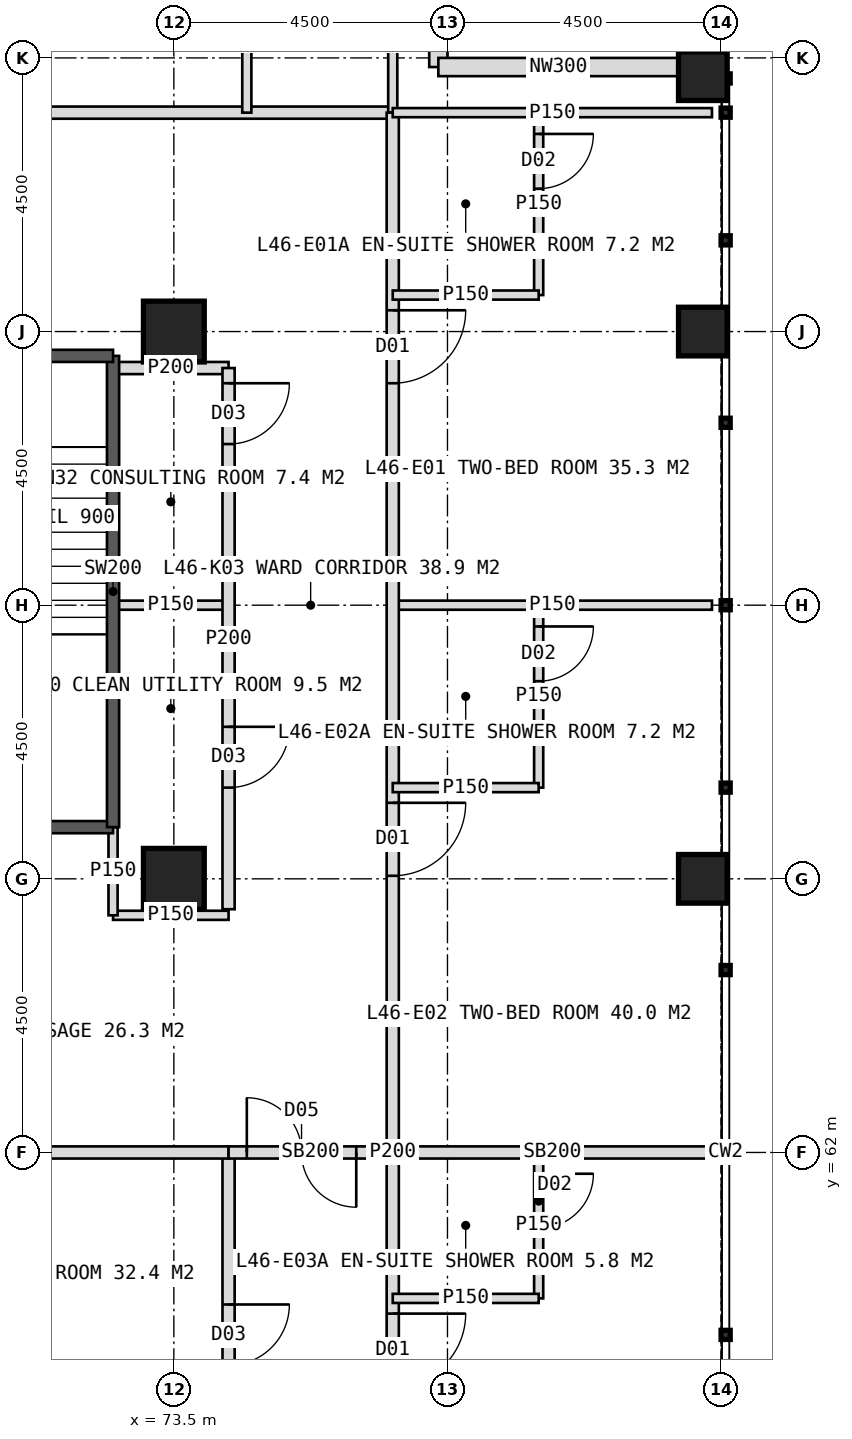
"""IFC4 building model, lengths in metres.
Left out: names, types, materials, properties, quantities, classifications, styles, units other than length and angle.
Written with IfcOpenShell. Run it as: python <this file> out.ifc"""

import sys

from ifc_helpers import new_model, si_unit, direction, frame, frame_2d, origin, origin_2d, place, context, subcontext, project, spatial, rectangle, hollow_rectangle, extrude, element, fill, save


model = new_model("IFC4")
c1 = context("Model", 3, precision=1e-05, world=origin(), true_north=direction((0.0, 1.0)))
c2 = subcontext(c1, "Body", "Model", "MODEL_VIEW")
j1 = project(units=[si_unit("LENGTHUNIT", "METRE"), si_unit("PLANEANGLEUNIT", "RADIAN")], contexts=[c1])
p1 = place(None, origin())
s1 = spatial("IfcSite", under=j1, at=p1, CompositionType="ELEMENT")
p2 = place(p1, origin())
s2 = spatial("IfcBuilding", under=s1, at=p2, CompositionType="ELEMENT")
p3 = place(p2, frame((0.0, 0.0, 193.0)))
s3 = spatial("IfcBuildingStorey", under=s2, at=p3, CompositionType="ELEMENT", Elevation=193.0)
for number, where, z_axis, x_axis in (
    (1, (73.5, 75.5, 0.0), (0.0, 0.0, 1.0), (1.0, 0.0, 0.0)),
    (2, (73.5, 66.5, 0.0), (0.0, 0.0, 1.0), (1.0, 0.0, 0.0)),
):
    element("IfcColumn", number, at=place(p3, frame(where, z_axis=z_axis, x_axis=x_axis)), inside=s3, PredefinedType="COLUMN", context=c2, shape_type="SweptSolid", body=[
        extrude(hollow_rectangle(XDim=1.0, YDim=1.0, WallThickness=0.1, at=origin_2d()), origin(), (0.0, 0.0, 1.0), 4.0),
    ])
for number, where, z_axis, x_axis in (
    (3, (82.2, 66.5, 0.0), (0.0, 0.0, 1.0), (1.0, 0.0, 0.0)),
    (4, (82.2, 75.5, 0.0), (0.0, 0.0, 1.0), (1.0, 0.0, 0.0)),
    (5, (82.2, 79.7, 0.0), (0.0, 0.0, 1.0), (1.0, 0.0, 0.0)),
):
    element("IfcColumn", number, at=place(p3, frame(where, z_axis=z_axis, x_axis=x_axis)), inside=s3, PredefinedType="COLUMN", context=c2, shape_type="SweptSolid", body=[
        extrude(hollow_rectangle(XDim=0.8, YDim=0.8, WallThickness=0.08, at=origin_2d()), origin(), (0.0, 0.0, 1.0), 4.0),
    ])
for number, where, z_axis, x_axis in (
    (6, (77.85, 83.8, 0.0), (0.0, 0.0, 1.0), (0.0, -1.0, 0.0)),
    (7, (77.85, 79.85, 0.0), (0.0, 0.0, 1.0), (1.0, 0.0, 0.0)),
):
    element("IfcWall", number, at=place(p3, frame(where, z_axis=z_axis, x_axis=x_axis)), inside=s3, PredefinedType="ELEMENTEDWALL", context=c2, shape_type="SweptSolid", body=[
        extrude(rectangle(XDim=3.95, YDim=0.3, at=frame_2d((1.975, 0.0))), origin(), (0.0, 0.0, 1.0), 2.85),
    ])
p4 = place(p3, frame((42.9, 79.1, 0.0), z_axis=(0.0, 0.0, 1.0), x_axis=(1.0, 0.0, 0.0)))
e8 = element("IfcWall", 8, at=p4, inside=s3, PredefinedType="PARTITIONING", context=c2, shape_type="SweptSolid", body=[
    extrude(rectangle(XDim=34.2, YDim=0.2, at=frame_2d((17.1, 0.0))), origin(), (0.0, 0.0, 1.0), 3.75),
])
p5 = place(p4, frame((3.25, 0.0, 0.0)))
e9 = element("IfcOpeningElement", 9, at=p5, cuts=e8, PredefinedType="OPENING", context=c2, shape_type="SweptSolid", body=[
    extrude(rectangle(XDim=1.2, YDim=2.2, at=frame_2d((0.6, 1.1))), frame((0.0, 0.11, 0.0), z_axis=(0.0, -1.0, 0.0), x_axis=(1.0, 0.0, 0.0)), (0.0, 0.0, 1.0), 0.22),
])
p6 = place(p4, frame((10.6, 0.0, 0.0)))
e10 = element("IfcOpeningElement", 10, at=p6, cuts=e8, PredefinedType="OPENING", context=c2, shape_type="SweptSolid", body=[
    extrude(rectangle(XDim=1.0, YDim=2.1, at=frame_2d((0.5, 1.05))), frame((0.0, 0.11, 0.0), z_axis=(0.0, -1.0, 0.0), x_axis=(1.0, 0.0, 0.0)), (0.0, 0.0, 1.0), 0.22),
])
p7 = place(p4, frame((17.35, 0.0, 0.0)))
e11 = element("IfcOpeningElement", 11, at=p7, cuts=e8, PredefinedType="OPENING", context=c2, shape_type="SweptSolid", body=[
    extrude(rectangle(XDim=1.2, YDim=2.2, at=frame_2d((0.6, 1.1))), frame((0.0, 0.11, 0.0), z_axis=(0.0, -1.0, 0.0), x_axis=(1.0, 0.0, 0.0)), (0.0, 0.0, 1.0), 0.22),
])
p8 = place(p4, frame((25.75, 0.0, 0.0)))
e12 = element("IfcOpeningElement", 12, at=p8, cuts=e8, PredefinedType="OPENING", context=c2, shape_type="SweptSolid", body=[
    extrude(rectangle(XDim=1.2, YDim=2.2, at=frame_2d((0.6, 1.1))), frame((0.0, 0.11, 0.0), z_axis=(0.0, -1.0, 0.0), x_axis=(1.0, 0.0, 0.0)), (0.0, 0.0, 1.0), 0.22),
])
for number, where, z_axis, x_axis in (
    (13, (74.7, 79.1, 0.0), (0.0, 0.0, 1.0), (0.0, 1.0, 0.0)),
    (14, (77.1, 79.1, 0.0), (0.0, 0.0, 1.0), (0.0, 1.0, 0.0)),
):
    element("IfcWall", number, at=place(p3, frame(where, z_axis=z_axis, x_axis=x_axis)), inside=s3, PredefinedType="PARTITIONING", context=c2, shape_type="SweptSolid", body=[
        extrude(rectangle(XDim=2.4, YDim=0.15, at=frame_2d((1.2, 0.0))), origin(), (0.0, 0.0, 1.0), 3.75),
    ])
p9 = place(p3, frame((72.5, 74.9, 0.0), z_axis=(0.0, 0.0, 1.0), x_axis=(1.0, 0.0, 0.0)))
e15 = element("IfcWall", 15, at=p9, inside=s3, PredefinedType="PARTITIONING", context=c2, shape_type="SweptSolid", body=[
    extrude(rectangle(XDim=1.9, YDim=0.2, at=frame_2d((0.95, 0.0))), origin(), (0.0, 0.0, 1.0), 3.75),
])
p10 = place(p3, frame((77.1, 71.0, 0.0), z_axis=(0.0, 0.0, 1.0), x_axis=(1.0, 0.0, 0.0)))
e16 = element("IfcWall", 16, at=p10, inside=s3, PredefinedType="PARTITIONING", context=c2, shape_type="SweptSolid", body=[
    extrude(rectangle(XDim=5.25, YDim=0.15, at=frame_2d((2.625, 0.0))), origin(), (0.0, 0.0, 1.0), 3.75),
])
p11 = place(p3, frame((77.1, 62.0, 0.0), z_axis=(0.0, 0.0, 1.0), x_axis=(1.0, 0.0, 0.0)))
e17 = element("IfcWall", 17, at=p11, inside=s3, PredefinedType="SOLIDWALL", context=c2, shape_type="SweptSolid", body=[
    extrude(rectangle(XDim=5.25, YDim=0.2, at=frame_2d((2.625, 0.0))), origin(), (0.0, 0.0, 1.0), 2.95),
])
p12 = place(p3, frame((77.1, 79.1, 0.0), z_axis=(0.0, 0.0, 1.0), x_axis=(0.0, -1.0, 0.0)))
e18 = element("IfcWall", 18, at=p12, inside=s3, PredefinedType="PARTITIONING", context=c2, shape_type="SweptSolid", body=[
    extrude(rectangle(XDim=34.2, YDim=0.2, at=frame_2d((17.1, 0.0))), origin(), (0.0, 0.0, 1.0), 3.75),
])
p13 = place(p12, frame((3.25, 0.0, 0.0)))
e19 = element("IfcOpeningElement", 19, at=p13, cuts=e18, PredefinedType="OPENING", context=c2, shape_type="SweptSolid", body=[
    extrude(rectangle(XDim=1.2, YDim=2.2, at=frame_2d((0.6, 1.1))), frame((0.0, 0.11, 0.0), z_axis=(0.0, -1.0, 0.0), x_axis=(1.0, 0.0, 0.0)), (0.0, 0.0, 1.0), 0.22),
])
p14 = place(p12, frame((11.35, 0.0, 0.0)))
e20 = element("IfcOpeningElement", 20, at=p14, cuts=e18, PredefinedType="OPENING", context=c2, shape_type="SweptSolid", body=[
    extrude(rectangle(XDim=1.2, YDim=2.2, at=frame_2d((0.6, 1.1))), frame((0.0, 0.11, 0.0), z_axis=(0.0, -1.0, 0.0), x_axis=(1.0, 0.0, 0.0)), (0.0, 0.0, 1.0), 0.22),
])
p15 = place(p12, frame((19.75, 0.0, 0.0)))
e21 = element("IfcOpeningElement", 21, at=p15, cuts=e18, PredefinedType="OPENING", context=c2, shape_type="SweptSolid", body=[
    extrude(rectangle(XDim=1.2, YDim=2.2, at=frame_2d((0.6, 1.1))), frame((0.0, 0.11, 0.0), z_axis=(0.0, -1.0, 0.0), x_axis=(1.0, 0.0, 0.0)), (0.0, 0.0, 1.0), 0.22),
])
p16 = place(p12, frame((25.75, 0.0, 0.0)))
e22 = element("IfcOpeningElement", 22, at=p16, cuts=e18, PredefinedType="OPENING", context=c2, shape_type="SweptSolid", body=[
    extrude(rectangle(XDim=1.2, YDim=2.2, at=frame_2d((0.6, 1.1))), frame((0.0, 0.11, 0.0), z_axis=(0.0, -1.0, 0.0), x_axis=(1.0, 0.0, 0.0)), (0.0, 0.0, 1.0), 0.22),
])
p17 = place(p3, frame((77.1, 79.1, 0.0), z_axis=(0.0, 0.0, 1.0), x_axis=(1.0, 0.0, 0.0)))
e23 = element("IfcWall", 23, at=p17, inside=s3, PredefinedType="PARTITIONING", context=c2, shape_type="SweptSolid", body=[
    extrude(rectangle(XDim=5.25, YDim=0.15, at=frame_2d((2.625, 0.0))), origin(), (0.0, 0.0, 1.0), 3.75),
])
p18 = place(p3, frame((79.5, 79.1, 0.0), z_axis=(0.0, 0.0, 1.0), x_axis=(0.0, -1.0, 0.0)))
e24 = element("IfcWall", 24, at=p18, inside=s3, PredefinedType="PARTITIONING", context=c2, shape_type="SweptSolid", body=[
    extrude(rectangle(XDim=3.0, YDim=0.15, at=frame_2d((1.5, 0.0))), origin(), (0.0, 0.0, 1.0), 3.75),
])
p19 = place(p18, frame((0.35, 0.0, 0.0)))
e25 = element("IfcOpeningElement", 25, at=p19, cuts=e24, PredefinedType="OPENING", context=c2, shape_type="SweptSolid", body=[
    extrude(rectangle(XDim=0.9, YDim=2.1, at=frame_2d((0.45, 1.05))), frame((0.0, 0.085, 0.0), z_axis=(0.0, -1.0, 0.0), x_axis=(1.0, 0.0, 0.0)), (0.0, 0.0, 1.0), 0.17),
])
p20 = place(p3, frame((77.1, 76.1, 0.0), z_axis=(0.0, 0.0, 1.0), x_axis=(1.0, 0.0, 0.0)))
e26 = element("IfcWall", 26, at=p20, inside=s3, PredefinedType="PARTITIONING", context=c2, shape_type="SweptSolid", body=[
    extrude(rectangle(XDim=2.4, YDim=0.15, at=frame_2d((1.2, 0.0))), origin(), (0.0, 0.0, 1.0), 3.75),
])
p21 = place(p3, frame((79.5, 71.0, 0.0), z_axis=(0.0, 0.0, 1.0), x_axis=(0.0, -1.0, 0.0)))
e27 = element("IfcWall", 27, at=p21, inside=s3, PredefinedType="PARTITIONING", context=c2, shape_type="SweptSolid", body=[
    extrude(rectangle(XDim=3.0, YDim=0.15, at=frame_2d((1.5, 0.0))), origin(), (0.0, 0.0, 1.0), 3.75),
])
p22 = place(p21, frame((0.35, 0.0, 0.0)))
e28 = element("IfcOpeningElement", 28, at=p22, cuts=e27, PredefinedType="OPENING", context=c2, shape_type="SweptSolid", body=[
    extrude(rectangle(XDim=0.9, YDim=2.1, at=frame_2d((0.45, 1.05))), frame((0.0, 0.085, 0.0), z_axis=(0.0, -1.0, 0.0), x_axis=(1.0, 0.0, 0.0)), (0.0, 0.0, 1.0), 0.17),
])
p23 = place(p3, frame((77.1, 68.0, 0.0), z_axis=(0.0, 0.0, 1.0), x_axis=(1.0, 0.0, 0.0)))
e29 = element("IfcWall", 29, at=p23, inside=s3, PredefinedType="PARTITIONING", context=c2, shape_type="SweptSolid", body=[
    extrude(rectangle(XDim=2.4, YDim=0.15, at=frame_2d((1.2, 0.0))), origin(), (0.0, 0.0, 1.0), 3.75),
])
p24 = place(p3, frame((79.5, 62.0, 0.0), z_axis=(0.0, 0.0, 1.0), x_axis=(0.0, -1.0, 0.0)))
e30 = element("IfcWall", 30, at=p24, inside=s3, PredefinedType="PARTITIONING", context=c2, shape_type="SweptSolid", body=[
    extrude(rectangle(XDim=2.4, YDim=0.15, at=frame_2d((1.2, 0.0))), origin(), (0.0, 0.0, 1.0), 3.75),
])
p25 = place(p24, frame((0.35, 0.0, 0.0)))
e31 = element("IfcOpeningElement", 31, at=p25, cuts=e30, PredefinedType="OPENING", context=c2, shape_type="SweptSolid", body=[
    extrude(rectangle(XDim=0.9, YDim=2.1, at=frame_2d((0.45, 1.05))), frame((0.0, 0.085, 0.0), z_axis=(0.0, -1.0, 0.0), x_axis=(1.0, 0.0, 0.0)), (0.0, 0.0, 1.0), 0.17),
])
p26 = place(p3, frame((77.1, 59.6, 0.0), z_axis=(0.0, 0.0, 1.0), x_axis=(1.0, 0.0, 0.0)))
e32 = element("IfcWall", 32, at=p26, inside=s3, PredefinedType="PARTITIONING", context=c2, shape_type="SweptSolid", body=[
    extrude(rectangle(XDim=2.4, YDim=0.15, at=frame_2d((1.2, 0.0))), origin(), (0.0, 0.0, 1.0), 3.75),
])
p27 = place(p3, frame((72.5, 71.0, 0.0), z_axis=(0.0, 0.0, 1.0), x_axis=(1.0, 0.0, 0.0)))
e33 = element("IfcWall", 33, at=p27, inside=s3, PredefinedType="PARTITIONING", context=c2, shape_type="SweptSolid", body=[
    extrude(rectangle(XDim=1.9, YDim=0.15, at=frame_2d((0.95, 0.0))), origin(), (0.0, 0.0, 1.0), 3.75),
])
p28 = place(p3, frame((74.4, 74.9, 0.0), z_axis=(0.0, 0.0, 1.0), x_axis=(0.0, -1.0, 0.0)))
e34 = element("IfcWall", 34, at=p28, inside=s3, PredefinedType="PARTITIONING", context=c2, shape_type="SweptSolid", body=[
    extrude(rectangle(XDim=8.9, YDim=0.2, at=frame_2d((4.45, 0.0))), origin(), (0.0, 0.0, 1.0), 3.75),
])
p29 = place(p28, frame((0.25, 0.0, 0.0)))
e35 = element("IfcOpeningElement", 35, at=p29, cuts=e34, PredefinedType="OPENING", context=c2, shape_type="SweptSolid", body=[
    extrude(rectangle(XDim=1.0, YDim=2.1, at=frame_2d((0.5, 1.05))), frame((0.0, 0.11, 0.0), z_axis=(0.0, -1.0, 0.0), x_axis=(1.0, 0.0, 0.0)), (0.0, 0.0, 1.0), 0.22),
])
p30 = place(p28, frame((5.9, 0.0, 0.0)))
e36 = element("IfcOpeningElement", 36, at=p30, cuts=e34, PredefinedType="OPENING", context=c2, shape_type="SweptSolid", body=[
    extrude(rectangle(XDim=1.0, YDim=2.1, at=frame_2d((0.5, 1.05))), frame((0.0, 0.11, 0.0), z_axis=(0.0, -1.0, 0.0), x_axis=(1.0, 0.0, 0.0)), (0.0, 0.0, 1.0), 0.22),
])
p31 = place(p3, frame((74.4, 62.0, 0.0), z_axis=(0.0, 0.0, 1.0), x_axis=(0.0, -1.0, 0.0)))
e37 = element("IfcWall", 37, at=p31, inside=s3, PredefinedType="PARTITIONING", context=c2, shape_type="SweptSolid", body=[
    extrude(rectangle(XDim=14.4, YDim=0.2, at=frame_2d((7.2, 0.0))), origin(), (0.0, 0.0, 1.0), 3.75),
])
p32 = place(p31, frame((2.5, 0.0, 0.0)))
e38 = element("IfcOpeningElement", 38, at=p32, cuts=e37, PredefinedType="OPENING", context=c2, shape_type="SweptSolid", body=[
    extrude(rectangle(XDim=1.0, YDim=2.1, at=frame_2d((0.5, 1.05))), frame((0.0, 0.11, 0.0), z_axis=(0.0, -1.0, 0.0), x_axis=(1.0, 0.0, 0.0)), (0.0, 0.0, 1.0), 0.22),
])
p33 = place(p31, frame((7.0, 0.0, 0.0)))
e39 = element("IfcOpeningElement", 39, at=p33, cuts=e37, PredefinedType="OPENING", context=c2, shape_type="SweptSolid", body=[
    extrude(rectangle(XDim=1.0, YDim=2.1, at=frame_2d((0.5, 1.05))), frame((0.0, 0.11, 0.0), z_axis=(0.0, -1.0, 0.0), x_axis=(1.0, 0.0, 0.0)), (0.0, 0.0, 1.0), 0.22),
])
p34 = place(p31, frame((11.2, 0.0, 0.0)))
e40 = element("IfcOpeningElement", 40, at=p34, cuts=e37, PredefinedType="OPENING", context=c2, shape_type="SweptSolid", body=[
    extrude(rectangle(XDim=1.0, YDim=2.1, at=frame_2d((0.5, 1.05))), frame((0.0, 0.11, 0.0), z_axis=(0.0, -1.0, 0.0), x_axis=(1.0, 0.0, 0.0)), (0.0, 0.0, 1.0), 0.22),
])
p35 = place(p3, frame((72.5, 65.9, 0.0), z_axis=(0.0, 0.0, 1.0), x_axis=(1.0, 0.0, 0.0)))
e41 = element("IfcWall", 41, at=p35, inside=s3, PredefinedType="PARTITIONING", context=c2, shape_type="SweptSolid", body=[
    extrude(rectangle(XDim=1.9, YDim=0.15, at=frame_2d((0.95, 0.0))), origin(), (0.0, 0.0, 1.0), 3.75),
])
p36 = place(p3, frame((69.0, 62.0, 0.0), z_axis=(0.0, 0.0, 1.0), x_axis=(1.0, 0.0, 0.0)))
e42 = element("IfcWall", 42, at=p36, inside=s3, PredefinedType="SOLIDWALL", context=c2, shape_type="SweptSolid", body=[
    extrude(rectangle(XDim=5.4, YDim=0.2, at=frame_2d((2.7, 0.0))), origin(), (0.0, 0.0, 1.0), 2.95),
])
p37 = place(p3, frame((74.4, 62.0, 0.0), z_axis=(0.0, 0.0, 1.0), x_axis=(1.0, 0.0, 0.0)))
e43 = element("IfcWall", 43, at=p37, inside=s3, PredefinedType="SOLIDWALL", context=c2, shape_type="SweptSolid", body=[
    extrude(rectangle(XDim=2.7, YDim=0.2, at=frame_2d((1.35, 0.0))), origin(), (0.0, 0.0, 1.0), 2.95),
])
p38 = place(p37, frame((0.3, 0.0, 0.0)))
e44 = element("IfcOpeningElement", 44, at=p38, cuts=e43, PredefinedType="OPENING", context=c2, shape_type="SweptSolid", body=[
    extrude(rectangle(XDim=1.8, YDim=2.2, at=frame_2d((0.9, 1.1))), frame((0.0, 0.11, 0.0), z_axis=(0.0, -1.0, 0.0), x_axis=(1.0, 0.0, 0.0)), (0.0, 0.0, 1.0), 0.22),
])
p39 = place(p3, frame((72.5, 65.9, 0.0), z_axis=(0.0, 0.0, 1.0), x_axis=(0.0, 1.0, 0.0)))
e45 = element("IfcWall", 45, at=p39, inside=s3, PredefinedType="PARTITIONING", context=c2, shape_type="SweptSolid", body=[
    extrude(rectangle(XDim=1.45, YDim=0.15, at=frame_2d((0.725, 0.0))), origin(), (0.0, 0.0, 1.0), 3.75),
])
p40 = place(p3, frame((69.0, 67.35, 0.0), z_axis=(0.0, 0.0, 1.0), x_axis=(1.0, 0.0, 0.0)))
e46 = element("IfcWall", 46, at=p40, inside=s3, PredefinedType="SOLIDWALL", context=c2, shape_type="SweptSolid", body=[
    extrude(rectangle(XDim=3.5, YDim=0.2, at=frame_2d((1.75, 0.0))), origin(), (0.0, 0.0, 1.0), 3.75),
])
p41 = place(p3, frame((72.5, 67.35, 0.0), z_axis=(0.0, 0.0, 1.0), x_axis=(0.0, 1.0, 0.0)))
e47 = element("IfcWall", 47, at=p41, inside=s3, PredefinedType="SOLIDWALL", context=c2, shape_type="SweptSolid", body=[
    extrude(rectangle(XDim=7.75, YDim=0.2, at=frame_2d((3.875, 0.0))), origin(), (0.0, 0.0, 1.0), 3.75),
])
p42 = place(p3, frame((69.0, 75.1, 0.0), z_axis=(0.0, 0.0, 1.0), x_axis=(1.0, 0.0, 0.0)))
e48 = element("IfcWall", 48, at=p42, inside=s3, PredefinedType="SOLIDWALL", context=c2, shape_type="SweptSolid", body=[
    extrude(rectangle(XDim=3.5, YDim=0.2, at=frame_2d((1.75, 0.0))), origin(), (0.0, 0.0, 1.0), 3.75),
])
p43 = place(p42, frame((1.15, 0.0, 0.0)))
e49 = element("IfcOpeningElement", 49, at=p43, cuts=e48, PredefinedType="OPENING", context=c2, shape_type="SweptSolid", body=[
    extrude(rectangle(XDim=1.2, YDim=2.1, at=frame_2d((0.6, 1.05))), frame((0.0, 0.11, 0.0), z_axis=(0.0, -1.0, 0.0), x_axis=(1.0, 0.0, 0.0)), (0.0, 0.0, 1.0), 0.22),
])
p44 = place(p29, origin())
e50 = element("IfcDoor", 50, at=p44, inside=s3, OperationType="SINGLE_SWING_LEFT", PredefinedType="DOOR", context=c2, shape_type="SweptSolid", body=[
    extrude(rectangle(XDim=1.0, YDim=2.1, at=frame_2d((0.5, 1.05))), frame((0.0, 0.025, 0.0), z_axis=(0.0, -1.0, 0.0), x_axis=(1.0, 0.0, 0.0)), (0.0, 0.0, 1.0), 0.05),
])
fill(e35, e50)
p45 = place(p13, origin())
e51 = element("IfcDoor", 51, at=p45, inside=s3, OperationType="SINGLE_SWING_LEFT", PredefinedType="DOOR", context=c2, shape_type="SweptSolid", body=[
    extrude(rectangle(XDim=1.2, YDim=2.2, at=frame_2d((0.6, 1.1))), frame((0.0, 0.025, 0.0), z_axis=(0.0, -1.0, 0.0), x_axis=(1.0, 0.0, 0.0)), (0.0, 0.0, 1.0), 0.05),
])
fill(e19, e51)
p46 = place(p19, origin())
e52 = element("IfcDoor", 52, at=p46, inside=s3, OperationType="SINGLE_SWING_LEFT", PredefinedType="DOOR", context=c2, shape_type="SweptSolid", body=[
    extrude(rectangle(XDim=0.9, YDim=2.1, at=frame_2d((0.45, 1.05))), frame((0.0, 0.025, 0.0), z_axis=(0.0, -1.0, 0.0), x_axis=(1.0, 0.0, 0.0)), (0.0, 0.0, 1.0), 0.05),
])
fill(e25, e52)
p47 = place(p14, origin())
e53 = element("IfcDoor", 53, at=p47, inside=s3, OperationType="SINGLE_SWING_LEFT", PredefinedType="DOOR", context=c2, shape_type="SweptSolid", body=[
    extrude(rectangle(XDim=1.2, YDim=2.2, at=frame_2d((0.6, 1.1))), frame((0.0, 0.025, 0.0), z_axis=(0.0, -1.0, 0.0), x_axis=(1.0, 0.0, 0.0)), (0.0, 0.0, 1.0), 0.05),
])
fill(e20, e53)
p48 = place(p22, origin())
e54 = element("IfcDoor", 54, at=p48, inside=s3, OperationType="SINGLE_SWING_LEFT", PredefinedType="DOOR", context=c2, shape_type="SweptSolid", body=[
    extrude(rectangle(XDim=0.9, YDim=2.1, at=frame_2d((0.45, 1.05))), frame((0.0, 0.025, 0.0), z_axis=(0.0, -1.0, 0.0), x_axis=(1.0, 0.0, 0.0)), (0.0, 0.0, 1.0), 0.05),
])
fill(e28, e54)
p49 = place(p15, origin())
e55 = element("IfcDoor", 55, at=p49, inside=s3, OperationType="SINGLE_SWING_LEFT", PredefinedType="DOOR", context=c2, shape_type="SweptSolid", body=[
    extrude(rectangle(XDim=1.2, YDim=2.2, at=frame_2d((0.6, 1.1))), frame((0.0, 0.025, 0.0), z_axis=(0.0, -1.0, 0.0), x_axis=(1.0, 0.0, 0.0)), (0.0, 0.0, 1.0), 0.05),
])
fill(e21, e55)
p50 = place(p25, origin())
e56 = element("IfcDoor", 56, at=p50, inside=s3, OperationType="SINGLE_SWING_LEFT", PredefinedType="DOOR", context=c2, shape_type="SweptSolid", body=[
    extrude(rectangle(XDim=0.9, YDim=2.1, at=frame_2d((0.45, 1.05))), frame((0.0, 0.025, 0.0), z_axis=(0.0, -1.0, 0.0), x_axis=(1.0, 0.0, 0.0)), (0.0, 0.0, 1.0), 0.05),
])
fill(e31, e56)
p51 = place(p30, origin())
e57 = element("IfcDoor", 57, at=p51, inside=s3, OperationType="SINGLE_SWING_LEFT", PredefinedType="DOOR", context=c2, shape_type="SweptSolid", body=[
    extrude(rectangle(XDim=1.0, YDim=2.1, at=frame_2d((0.5, 1.05))), frame((0.0, 0.025, 0.0), z_axis=(0.0, -1.0, 0.0), x_axis=(1.0, 0.0, 0.0)), (0.0, 0.0, 1.0), 0.05),
])
fill(e36, e57)
p52 = place(p32, origin())
e58 = element("IfcDoor", 58, at=p52, inside=s3, OperationType="SINGLE_SWING_LEFT", PredefinedType="DOOR", context=c2, shape_type="SweptSolid", body=[
    extrude(rectangle(XDim=1.0, YDim=2.1, at=frame_2d((0.5, 1.05))), frame((0.0, 0.025, 0.0), z_axis=(0.0, -1.0, 0.0), x_axis=(1.0, 0.0, 0.0)), (0.0, 0.0, 1.0), 0.05),
])
fill(e38, e58)
p53 = place(p38, origin())
e59 = element("IfcDoor", 59, at=p53, inside=s3, OperationType="DOUBLE_DOOR_DOUBLE_SWING", PredefinedType="DOOR", context=c2, shape_type="SweptSolid", body=[
    extrude(rectangle(XDim=1.8, YDim=2.2, at=frame_2d((0.9, 1.1))), frame((0.0, 0.025, 0.0), z_axis=(0.0, -1.0, 0.0), x_axis=(1.0, 0.0, 0.0)), (0.0, 0.0, 1.0), 0.05),
])
fill(e44, e59)
save(model, sys.argv[1])
